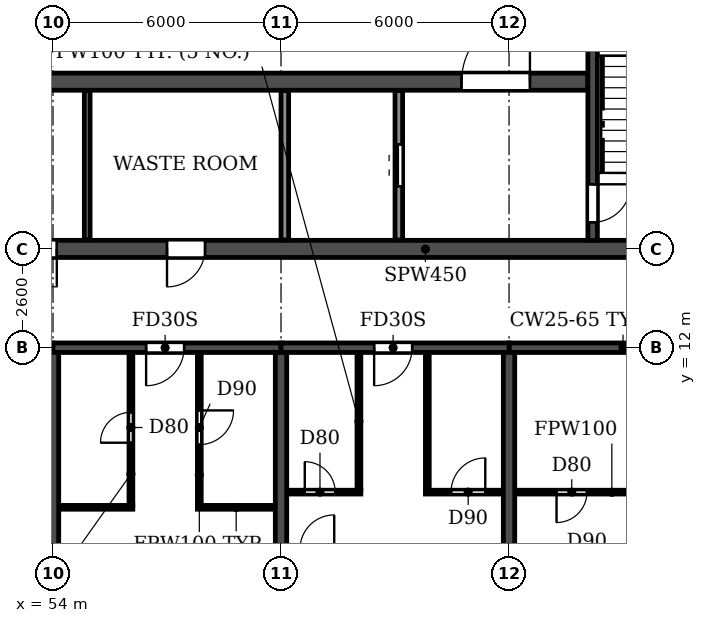
"""IFC4 building model, lengths in metres.
Left out: names, types, materials, properties, quantities, classifications, styles, units other than length and angle.
Written with IfcOpenShell. Run it as: python <this file> out.ifc"""

import sys

from ifc_helpers import new_model, si_unit, direction, frame, frame_2d, origin, place, context, subcontext, project, spatial, rectangle, extrude, element, fill, save


model = new_model("IFC4")
c1 = context("Model", 3, precision=1e-05, world=origin(), true_north=direction((0.0, 1.0)))
c2 = subcontext(c1, "Body", "Model", "MODEL_VIEW")
j1 = project(units=[si_unit("LENGTHUNIT", "METRE"), si_unit("PLANEANGLEUNIT", "RADIAN")], contexts=[c1])
p1 = place(None, origin())
s1 = spatial("IfcSite", under=j1, at=p1, CompositionType="ELEMENT")
p2 = place(p1, origin())
s2 = spatial("IfcBuilding", under=s1, at=p2, CompositionType="ELEMENT")
p3 = place(p2, frame((0.0, 0.0, 122.4)))
s3 = spatial("IfcBuildingStorey", under=s2, at=p3, CompositionType="ELEMENT", Elevation=122.4)
for number, where, z_axis, x_axis in (
    (1, (54.0, 0.2, 0.0), (0.0, 0.0, 1.0), (0.0, 1.0, 0.0)),
    (2, (60.0, 0.2, 0.0), (0.0, 0.0, 1.0), (0.0, 1.0, 0.0)),
    (3, (66.0, 0.2, 0.0), (0.0, 0.0, 1.0), (0.0, 1.0, 0.0)),
):
    element("IfcWall", number, at=place(p3, frame(where, z_axis=z_axis, x_axis=x_axis)), inside=s3, PredefinedType="SHEAR", context=c2, shape_type="SweptSolid", body=[
        extrude(rectangle(XDim=11.675, YDim=0.3, at=frame_2d((5.837, 0.0))), origin(), (0.0, 0.0, 1.0), 3.07),
    ])
p4 = place(p3, frame((48.0, 12.0, 0.0), z_axis=(0.0, 0.0, 1.0), x_axis=(1.0, 0.0, 0.0)))
e4 = element("IfcWall", 4, at=p4, inside=s3, PredefinedType="SHEAR", context=c2, shape_type="SweptSolid", body=[
    extrude(rectangle(XDim=6.0, YDim=0.25, at=frame_2d((3.0, 0.0))), origin(), (0.0, 0.0, 1.0), 2.47),
])
p5 = place(p4, frame((2.55, 0.0, 0.0)))
e5 = element("IfcOpeningElement", 5, at=p5, cuts=e4, PredefinedType="OPENING", context=c2, shape_type="SweptSolid", body=[
    extrude(rectangle(XDim=1.0, YDim=2.1, at=frame_2d((0.5, 1.05))), frame((0.0, 0.135, 0.0), z_axis=(0.0, -1.0, 0.0), x_axis=(1.0, 0.0, 0.0)), (0.0, 0.0, 1.0), 0.27),
])
p6 = place(p3, frame((54.0, 12.0, 0.0), z_axis=(0.0, 0.0, 1.0), x_axis=(1.0, 0.0, 0.0)))
e6 = element("IfcWall", 6, at=p6, inside=s3, PredefinedType="SHEAR", context=c2, shape_type="SweptSolid", body=[
    extrude(rectangle(XDim=6.0, YDim=0.25, at=frame_2d((3.0, 0.0))), origin(), (0.0, 0.0, 1.0), 2.47),
])
p7 = place(p6, frame((2.45, 0.0, 0.0)))
e7 = element("IfcOpeningElement", 7, at=p7, cuts=e6, PredefinedType="OPENING", context=c2, shape_type="SweptSolid", body=[
    extrude(rectangle(XDim=1.0, YDim=2.1, at=frame_2d((0.5, 1.05))), frame((0.0, 0.135, 0.0), z_axis=(0.0, -1.0, 0.0), x_axis=(1.0, 0.0, 0.0)), (0.0, 0.0, 1.0), 0.27),
])
p8 = place(p3, frame((60.0, 12.0, 0.0), z_axis=(0.0, 0.0, 1.0), x_axis=(1.0, 0.0, 0.0)))
e8 = element("IfcWall", 8, at=p8, inside=s3, PredefinedType="SHEAR", context=c2, shape_type="SweptSolid", body=[
    extrude(rectangle(XDim=6.0, YDim=0.25, at=frame_2d((3.0, 0.0))), origin(), (0.0, 0.0, 1.0), 2.47),
])
p9 = place(p8, frame((2.45, 0.0, 0.0)))
e9 = element("IfcOpeningElement", 9, at=p9, cuts=e8, PredefinedType="OPENING", context=c2, shape_type="SweptSolid", body=[
    extrude(rectangle(XDim=1.0, YDim=2.1, at=frame_2d((0.5, 1.05))), frame((0.0, 0.135, 0.0), z_axis=(0.0, -1.0, 0.0), x_axis=(1.0, 0.0, 0.0)), (0.0, 0.0, 1.0), 0.27),
])
p10 = place(p3, frame((66.0, 12.0, 0.0), z_axis=(0.0, 0.0, 1.0), x_axis=(1.0, 0.0, 0.0)))
e10 = element("IfcWall", 10, at=p10, inside=s3, PredefinedType="SHEAR", context=c2, shape_type="SweptSolid", body=[
    extrude(rectangle(XDim=6.0, YDim=0.25, at=frame_2d((3.0, 0.0))), origin(), (0.0, 0.0, 1.0), 2.47),
])
p11 = place(p3, frame((12.2, 14.6, 0.0), z_axis=(0.0, 0.0, 1.0), x_axis=(1.0, 0.0, 0.0)))
e11 = element("IfcWall", 11, at=p11, inside=s3, PredefinedType="SOLIDWALL", context=c2, shape_type="SweptSolid", body=[
    extrude(rectangle(XDim=77.6, YDim=0.45, at=frame_2d((38.8, 0.0))), origin(), (0.0, 0.0, 1.0), 3.07),
])
p12 = place(p11, frame((0.8, 0.0, 0.0)))
e12 = element("IfcOpeningElement", 12, at=p12, cuts=e11, PredefinedType="OPENING", context=c2, shape_type="SweptSolid", body=[
    extrude(rectangle(XDim=1.0, YDim=2.1, at=frame_2d((0.5, 1.05))), frame((0.0, 0.235, 0.0), z_axis=(0.0, -1.0, 0.0), x_axis=(1.0, 0.0, 0.0)), (0.0, 0.0, 1.0), 0.47),
])
p13 = place(p11, frame((3.8, 0.0, 0.0)))
e13 = element("IfcOpeningElement", 13, at=p13, cuts=e11, PredefinedType="OPENING", context=c2, shape_type="SweptSolid", body=[
    extrude(rectangle(XDim=1.0, YDim=2.1, at=frame_2d((0.5, 1.05))), frame((0.0, 0.235, 0.0), z_axis=(0.0, -1.0, 0.0), x_axis=(1.0, 0.0, 0.0)), (0.0, 0.0, 1.0), 0.47),
])
p14 = place(p11, frame((6.7, 0.0, 0.0)))
e14 = element("IfcOpeningElement", 14, at=p14, cuts=e11, PredefinedType="OPENING", context=c2, shape_type="SweptSolid", body=[
    extrude(rectangle(XDim=1.0, YDim=2.1, at=frame_2d((0.5, 1.05))), frame((0.0, 0.235, 0.0), z_axis=(0.0, -1.0, 0.0), x_axis=(1.0, 0.0, 0.0)), (0.0, 0.0, 1.0), 0.47),
])
p15 = place(p11, frame((14.6, 0.0, 0.0)))
e15 = element("IfcOpeningElement", 15, at=p15, cuts=e11, PredefinedType="OPENING", context=c2, shape_type="SweptSolid", body=[
    extrude(rectangle(XDim=1.0, YDim=2.1, at=frame_2d((0.5, 1.05))), frame((0.0, 0.235, 0.0), z_axis=(0.0, -1.0, 0.0), x_axis=(1.0, 0.0, 0.0)), (0.0, 0.0, 1.0), 0.47),
])
p16 = place(p11, frame((19.2, 0.0, 0.0)))
e16 = element("IfcOpeningElement", 16, at=p16, cuts=e11, PredefinedType="OPENING", context=c2, shape_type="SweptSolid", body=[
    extrude(rectangle(XDim=1.0, YDim=2.1, at=frame_2d((0.5, 1.05))), frame((0.0, 0.235, 0.0), z_axis=(0.0, -1.0, 0.0), x_axis=(1.0, 0.0, 0.0)), (0.0, 0.0, 1.0), 0.47),
])
p17 = place(p11, frame((30.5, 0.0, 0.0)))
e17 = element("IfcOpeningElement", 17, at=p17, cuts=e11, PredefinedType="OPENING", context=c2, shape_type="SweptSolid", body=[
    extrude(rectangle(XDim=1.0, YDim=2.1, at=frame_2d((0.5, 1.05))), frame((0.0, 0.235, 0.0), z_axis=(0.0, -1.0, 0.0), x_axis=(1.0, 0.0, 0.0)), (0.0, 0.0, 1.0), 0.47),
])
p18 = place(p11, frame((34.4, 0.0, 0.0)))
e18 = element("IfcOpeningElement", 18, at=p18, cuts=e11, PredefinedType="OPENING", context=c2, shape_type="SweptSolid", body=[
    extrude(rectangle(XDim=1.0, YDim=2.1, at=frame_2d((0.5, 1.05))), frame((0.0, 0.235, 0.0), z_axis=(0.0, -1.0, 0.0), x_axis=(1.0, 0.0, 0.0)), (0.0, 0.0, 1.0), 0.47),
])
p19 = place(p11, frame((38.3, 0.0, 0.0)))
e19 = element("IfcOpeningElement", 19, at=p19, cuts=e11, PredefinedType="OPENING", context=c2, shape_type="SweptSolid", body=[
    extrude(rectangle(XDim=1.0, YDim=2.1, at=frame_2d((0.5, 1.05))), frame((0.0, 0.235, 0.0), z_axis=(0.0, -1.0, 0.0), x_axis=(1.0, 0.0, 0.0)), (0.0, 0.0, 1.0), 0.47),
])
p20 = place(p11, frame((40.9, 0.0, 0.0)))
e20 = element("IfcOpeningElement", 20, at=p20, cuts=e11, PredefinedType="OPENING", context=c2, shape_type="SweptSolid", body=[
    extrude(rectangle(XDim=1.0, YDim=2.1, at=frame_2d((0.5, 1.05))), frame((0.0, 0.235, 0.0), z_axis=(0.0, -1.0, 0.0), x_axis=(1.0, 0.0, 0.0)), (0.0, 0.0, 1.0), 0.47),
])
p21 = place(p11, frame((44.8, 0.0, 0.0)))
e21 = element("IfcOpeningElement", 21, at=p21, cuts=e11, PredefinedType="OPENING", context=c2, shape_type="SweptSolid", body=[
    extrude(rectangle(XDim=1.0, YDim=2.1, at=frame_2d((0.5, 1.05))), frame((0.0, 0.235, 0.0), z_axis=(0.0, -1.0, 0.0), x_axis=(1.0, 0.0, 0.0)), (0.0, 0.0, 1.0), 0.47),
])
p22 = place(p11, frame((57.4, 0.0, 0.0)))
e22 = element("IfcOpeningElement", 22, at=p22, cuts=e11, PredefinedType="OPENING", context=c2, shape_type="SweptSolid", body=[
    extrude(rectangle(XDim=1.0, YDim=2.1, at=frame_2d((0.5, 1.05))), frame((0.0, 0.235, 0.0), z_axis=(0.0, -1.0, 0.0), x_axis=(1.0, 0.0, 0.0)), (0.0, 0.0, 1.0), 0.47),
])
p23 = place(p11, frame((62.0, 0.0, 0.0)))
e23 = element("IfcOpeningElement", 23, at=p23, cuts=e11, PredefinedType="OPENING", context=c2, shape_type="SweptSolid", body=[
    extrude(rectangle(XDim=1.0, YDim=2.1, at=frame_2d((0.5, 1.05))), frame((0.0, 0.235, 0.0), z_axis=(0.0, -1.0, 0.0), x_axis=(1.0, 0.0, 0.0)), (0.0, 0.0, 1.0), 0.47),
])
p24 = place(p11, frame((69.9, 0.0, 0.0)))
e24 = element("IfcOpeningElement", 24, at=p24, cuts=e11, PredefinedType="OPENING", context=c2, shape_type="SweptSolid", body=[
    extrude(rectangle(XDim=1.0, YDim=2.1, at=frame_2d((0.5, 1.05))), frame((0.0, 0.235, 0.0), z_axis=(0.0, -1.0, 0.0), x_axis=(1.0, 0.0, 0.0)), (0.0, 0.0, 1.0), 0.47),
])
p25 = place(p11, frame((72.8, 0.0, 0.0)))
e25 = element("IfcOpeningElement", 25, at=p25, cuts=e11, PredefinedType="OPENING", context=c2, shape_type="SweptSolid", body=[
    extrude(rectangle(XDim=1.0, YDim=2.1, at=frame_2d((0.5, 1.05))), frame((0.0, 0.235, 0.0), z_axis=(0.0, -1.0, 0.0), x_axis=(1.0, 0.0, 0.0)), (0.0, 0.0, 1.0), 0.47),
])
p26 = place(p11, frame((75.8, 0.0, 0.0)))
e26 = element("IfcOpeningElement", 26, at=p26, cuts=e11, PredefinedType="OPENING", context=c2, shape_type="SweptSolid", body=[
    extrude(rectangle(XDim=1.0, YDim=2.1, at=frame_2d((0.5, 1.05))), frame((0.0, 0.235, 0.0), z_axis=(0.0, -1.0, 0.0), x_axis=(1.0, 0.0, 0.0)), (0.0, 0.0, 1.0), 0.47),
])
p27 = place(p3, frame((33.925, 19.0, 0.0), z_axis=(0.0, 0.0, 1.0), x_axis=(1.0, 0.0, 0.0)))
e27 = element("IfcWall", 27, at=p27, inside=s3, PredefinedType="SOLIDWALL", context=c2, shape_type="SweptSolid", body=[
    extrude(rectangle(XDim=34.15, YDim=0.45, at=frame_2d((17.075, 0.0))), origin(), (0.0, 0.0, 1.0), 3.07),
])
p28 = place(p27, frame((16.175, 0.0, 0.0)))
e28 = element("IfcOpeningElement", 28, at=p28, cuts=e27, PredefinedType="OPENING", context=c2, shape_type="SweptSolid", body=[
    extrude(rectangle(XDim=1.8, YDim=2.1, at=frame_2d((0.9, 1.05))), frame((0.0, 0.235, 0.0), z_axis=(0.0, -1.0, 0.0), x_axis=(1.0, 0.0, 0.0)), (0.0, 0.0, 1.0), 0.47),
])
p29 = place(p27, frame((1.525, 0.0, 0.0)))
e29 = element("IfcOpeningElement", 29, at=p29, cuts=e27, PredefinedType="OPENING", context=c2, shape_type="SweptSolid", body=[
    extrude(rectangle(XDim=1.8, YDim=2.1, at=frame_2d((0.9, 1.05))), frame((0.0, 0.235, 0.0), z_axis=(0.0, -1.0, 0.0), x_axis=(1.0, 0.0, 0.0)), (0.0, 0.0, 1.0), 0.47),
])
p30 = place(p27, frame((30.825, 0.0, 0.0)))
e30 = element("IfcOpeningElement", 30, at=p30, cuts=e27, PredefinedType="OPENING", context=c2, shape_type="SweptSolid", body=[
    extrude(rectangle(XDim=1.8, YDim=2.1, at=frame_2d((0.9, 1.05))), frame((0.0, 0.235, 0.0), z_axis=(0.0, -1.0, 0.0), x_axis=(1.0, 0.0, 0.0)), (0.0, 0.0, 1.0), 0.47),
])
p31 = place(p3, frame((68.2, 14.825, 0.0), z_axis=(0.0, 0.0, 1.0), x_axis=(0.0, 1.0, 0.0)))
e31 = element("IfcWall", 31, at=p31, inside=s3, PredefinedType="SOLIDWALL", context=c2, shape_type="SweptSolid", body=[
    extrude(rectangle(XDim=7.65, YDim=0.25, at=frame_2d((3.825, 0.0))), origin(), (0.0, 0.0, 1.0), 3.07),
])
p32 = place(p31, frame((0.475, 0.0, 0.0)))
e32 = element("IfcOpeningElement", 32, at=p32, cuts=e31, PredefinedType="OPENING", context=c2, shape_type="SweptSolid", body=[
    extrude(rectangle(XDim=1.0, YDim=2.1, at=frame_2d((0.5, 1.05))), frame((0.0, 0.135, 0.0), z_axis=(0.0, -1.0, 0.0), x_axis=(1.0, 0.0, 0.0)), (0.0, 0.0, 1.0), 0.27),
])
p33 = place(p3, frame((54.16, 7.8, 0.0), z_axis=(0.0, 0.0, 1.0), x_axis=(1.0, 0.0, 0.0)))
e33 = element("IfcWall", 33, at=p33, inside=s3, PredefinedType="PARTITIONING", context=c2, shape_type="SweptSolid", body=[
    extrude(rectangle(XDim=1.94, YDim=0.1, at=frame_2d((0.97, 0.0))), origin(), (0.0, 0.0, 1.0), 3.07),
])
p34 = place(p3, frame((57.8, 7.8, 0.0), z_axis=(0.0, 0.0, 1.0), x_axis=(1.0, 0.0, 0.0)))
e34 = element("IfcWall", 34, at=p34, inside=s3, PredefinedType="PARTITIONING", context=c2, shape_type="SweptSolid", body=[
    extrude(rectangle(XDim=2.04, YDim=0.1, at=frame_2d((1.02, 0.0))), origin(), (0.0, 0.0, 1.0), 3.07),
])
p35 = place(p3, frame((60.16, 8.2, 0.0), z_axis=(0.0, 0.0, 1.0), x_axis=(1.0, 0.0, 0.0)))
e35 = element("IfcWall", 35, at=p35, inside=s3, PredefinedType="PARTITIONING", context=c2, shape_type="SweptSolid", body=[
    extrude(rectangle(XDim=1.94, YDim=0.1, at=frame_2d((0.97, 0.0))), origin(), (0.0, 0.0, 1.0), 3.07),
])
p36 = place(p35, frame((0.465, 0.0, 0.0)))
e36 = element("IfcOpeningElement", 36, at=p36, cuts=e35, PredefinedType="OPENING", context=c2, shape_type="SweptSolid", body=[
    extrude(rectangle(XDim=0.8, YDim=2.1, at=frame_2d((0.4, 1.05))), frame((0.0, 0.06, 0.0), z_axis=(0.0, -1.0, 0.0), x_axis=(1.0, 0.0, 0.0)), (0.0, 0.0, 1.0), 0.12),
])
p37 = place(p3, frame((63.8, 8.2, 0.0), z_axis=(0.0, 0.0, 1.0), x_axis=(1.0, 0.0, 0.0)))
e37 = element("IfcWall", 37, at=p37, inside=s3, PredefinedType="PARTITIONING", context=c2, shape_type="SweptSolid", body=[
    extrude(rectangle(XDim=2.04, YDim=0.1, at=frame_2d((1.02, 0.0))), origin(), (0.0, 0.0, 1.0), 3.07),
])
p38 = place(p37, frame((0.675, 0.0, 0.0)))
e38 = element("IfcOpeningElement", 38, at=p38, cuts=e37, PredefinedType="OPENING", context=c2, shape_type="SweptSolid", body=[
    extrude(rectangle(XDim=0.9, YDim=2.1, at=frame_2d((0.45, 1.05))), frame((0.0, 0.06, 0.0), z_axis=(0.0, -1.0, 0.0), x_axis=(1.0, 0.0, 0.0)), (0.0, 0.0, 1.0), 0.12),
])
p39 = place(p3, frame((66.16, 8.2, 0.0), z_axis=(0.0, 0.0, 1.0), x_axis=(1.0, 0.0, 0.0)))
e39 = element("IfcWall", 39, at=p39, inside=s3, PredefinedType="PARTITIONING", context=c2, shape_type="SweptSolid", body=[
    extrude(rectangle(XDim=3.19, YDim=0.1, at=frame_2d((1.595, 0.0))), origin(), (0.0, 0.0, 1.0), 3.07),
])
p40 = place(p39, frame((1.09, 0.0, 0.0)))
e40 = element("IfcOpeningElement", 40, at=p40, cuts=e39, PredefinedType="OPENING", context=c2, shape_type="SweptSolid", body=[
    extrude(rectangle(XDim=0.8, YDim=2.1, at=frame_2d((0.4, 1.05))), frame((0.0, 0.06, 0.0), z_axis=(0.0, -1.0, 0.0), x_axis=(1.0, 0.0, 0.0)), (0.0, 0.0, 1.0), 0.12),
])
p41 = place(p3, frame((56.05, 7.85, 0.0), z_axis=(0.0, 0.0, 1.0), x_axis=(0.0, 1.0, 0.0)))
e41 = element("IfcWall", 41, at=p41, inside=s3, PredefinedType="PARTITIONING", context=c2, shape_type="SweptSolid", body=[
    extrude(rectangle(XDim=4.015, YDim=0.1, at=frame_2d((2.007, 0.0))), origin(), (0.0, 0.0, 1.0), 3.07),
])
p42 = place(p41, frame((1.65, 0.0, 0.0)))
e42 = element("IfcOpeningElement", 42, at=p42, cuts=e41, PredefinedType="OPENING", context=c2, shape_type="SweptSolid", body=[
    extrude(rectangle(XDim=0.8, YDim=2.1, at=frame_2d((0.4, 1.05))), frame((0.0, 0.06, 0.0), z_axis=(0.0, -1.0, 0.0), x_axis=(1.0, 0.0, 0.0)), (0.0, 0.0, 1.0), 0.12),
])
p43 = place(p3, frame((57.85, 7.85, 0.0), z_axis=(0.0, 0.0, 1.0), x_axis=(0.0, 1.0, 0.0)))
e43 = element("IfcWall", 43, at=p43, inside=s3, PredefinedType="PARTITIONING", context=c2, shape_type="SweptSolid", body=[
    extrude(rectangle(XDim=4.015, YDim=0.1, at=frame_2d((2.007, 0.0))), origin(), (0.0, 0.0, 1.0), 3.07),
])
p44 = place(p43, frame((1.6, 0.0, 0.0)))
e44 = element("IfcOpeningElement", 44, at=p44, cuts=e43, PredefinedType="OPENING", context=c2, shape_type="SweptSolid", body=[
    extrude(rectangle(XDim=0.9, YDim=2.1, at=frame_2d((0.45, 1.05))), frame((0.0, 0.06, 0.0), z_axis=(0.0, -1.0, 0.0), x_axis=(1.0, 0.0, 0.0)), (0.0, 0.0, 1.0), 0.12),
])
for number, where, z_axis, x_axis in (
    (45, (62.05, 8.25, 0.0), (0.0, 0.0, 1.0), (0.0, 1.0, 0.0)),
    (46, (63.85, 8.25, 0.0), (0.0, 0.0, 1.0), (0.0, 1.0, 0.0)),
):
    element("IfcWall", number, at=place(p3, frame(where, z_axis=z_axis, x_axis=x_axis)), inside=s3, PredefinedType="PARTITIONING", context=c2, shape_type="SweptSolid", body=[
        extrude(rectangle(XDim=3.615, YDim=0.1, at=frame_2d((1.808, 0.0))), origin(), (0.0, 0.0, 1.0), 3.07),
    ])
p45 = place(p3, frame((54.9, 14.835, 0.0), z_axis=(0.0, 0.0, 1.0), x_axis=(0.0, 1.0, 0.0)))
e47 = element("IfcWall", 47, at=p45, inside=s3, PredefinedType="PARTITIONING", context=c2, shape_type="SweptSolid", body=[
    extrude(rectangle(XDim=3.93, YDim=0.15, at=frame_2d((1.965, 0.0))), origin(), (0.0, 0.0, 1.0), 3.07),
])
p46 = place(p3, frame((60.1, 14.835, 0.0), z_axis=(0.0, 0.0, 1.0), x_axis=(0.0, 1.0, 0.0)))
e48 = element("IfcWall", 48, at=p46, inside=s3, PredefinedType="PARTITIONING", context=c2, shape_type="SweptSolid", body=[
    extrude(rectangle(XDim=3.93, YDim=0.2, at=frame_2d((1.965, 0.0))), origin(), (0.0, 0.0, 1.0), 3.07),
])
p47 = place(p3, frame((63.1, 14.835, 0.0), z_axis=(0.0, 0.0, 1.0), x_axis=(0.0, 1.0, 0.0)))
e49 = element("IfcWall", 49, at=p47, inside=s3, PredefinedType="PARTITIONING", context=c2, shape_type="SweptSolid", body=[
    extrude(rectangle(XDim=3.93, YDim=0.2, at=frame_2d((1.965, 0.0))), origin(), (0.0, 0.0, 1.0), 3.07),
])
p48 = place(p47, frame((1.415, 0.0, 0.0)))
e50 = element("IfcOpeningElement", 50, at=p48, cuts=e49, PredefinedType="OPENING", context=c2, shape_type="SweptSolid", body=[
    extrude(rectangle(XDim=1.1, YDim=2.1, at=frame_2d((0.55, 1.05))), frame((0.0, 0.11, 0.0), z_axis=(0.0, -1.0, 0.0), x_axis=(1.0, 0.0, 0.0)), (0.0, 0.0, 1.0), 0.22),
])
p49 = place(p20, frame((1.0, 0.0, 0.0), z_axis=(0.0, 0.0, 1.0), x_axis=(-1.0, 0.0, 0.0)))
e51 = element("IfcDoor", 51, at=p49, inside=s3, OperationType="SINGLE_SWING_LEFT", PredefinedType="DOOR", context=c2, shape_type="SweptSolid", body=[
    extrude(rectangle(XDim=1.0, YDim=2.1, at=frame_2d((0.5, 1.05))), frame((0.0, 0.025, 0.0), z_axis=(0.0, -1.0, 0.0), x_axis=(1.0, 0.0, 0.0)), (0.0, 0.0, 1.0), 0.05),
])
fill(e20, e51)
p50 = place(p21, frame((1.0, 0.0, 0.0), z_axis=(0.0, 0.0, 1.0), x_axis=(-1.0, 0.0, 0.0)))
e52 = element("IfcDoor", 52, at=p50, inside=s3, OperationType="SINGLE_SWING_RIGHT", PredefinedType="DOOR", context=c2, shape_type="SweptSolid", body=[
    extrude(rectangle(XDim=1.0, YDim=2.1, at=frame_2d((0.5, 1.05))), frame((0.0, 0.025, 0.0), z_axis=(0.0, -1.0, 0.0), x_axis=(1.0, 0.0, 0.0)), (0.0, 0.0, 1.0), 0.05),
])
fill(e21, e52)
p51 = place(p42, origin())
e53 = element("IfcDoor", 53, at=p51, inside=s3, OperationType="SINGLE_SWING_LEFT", PredefinedType="DOOR", context=c2, shape_type="SweptSolid", body=[
    extrude(rectangle(XDim=0.8, YDim=2.1, at=frame_2d((0.4, 1.05))), frame((0.0, 0.025, 0.0), z_axis=(0.0, -1.0, 0.0), x_axis=(1.0, 0.0, 0.0)), (0.0, 0.0, 1.0), 0.05),
])
fill(e42, e53)
p52 = place(p7, frame((1.0, 0.0, 0.0), z_axis=(0.0, 0.0, 1.0), x_axis=(-1.0, 0.0, 0.0)))
e54 = element("IfcDoor", 54, at=p52, inside=s3, OperationType="SINGLE_SWING_RIGHT", PredefinedType="DOOR", context=c2, shape_type="SweptSolid", body=[
    extrude(rectangle(XDim=1.0, YDim=2.1, at=frame_2d((0.5, 1.05))), frame((0.0, 0.025, 0.0), z_axis=(0.0, -1.0, 0.0), x_axis=(1.0, 0.0, 0.0)), (0.0, 0.0, 1.0), 0.05),
])
fill(e7, e54)
p53 = place(p44, frame((0.9, 0.0, 0.0), z_axis=(0.0, 0.0, 1.0), x_axis=(-1.0, 0.0, 0.0)))
e55 = element("IfcDoor", 55, at=p53, inside=s3, OperationType="SINGLE_SWING_LEFT", PredefinedType="DOOR", context=c2, shape_type="SweptSolid", body=[
    extrude(rectangle(XDim=0.9, YDim=2.1, at=frame_2d((0.45, 1.05))), frame((0.0, 0.025, 0.0), z_axis=(0.0, -1.0, 0.0), x_axis=(1.0, 0.0, 0.0)), (0.0, 0.0, 1.0), 0.05),
])
fill(e44, e55)
p54 = place(p36, origin())
e56 = element("IfcDoor", 56, at=p54, inside=s3, OperationType="SINGLE_SWING_LEFT", PredefinedType="DOOR", context=c2, shape_type="SweptSolid", body=[
    extrude(rectangle(XDim=0.8, YDim=2.1, at=frame_2d((0.4, 1.05))), frame((0.0, 0.025, 0.0), z_axis=(0.0, -1.0, 0.0), x_axis=(1.0, 0.0, 0.0)), (0.0, 0.0, 1.0), 0.05),
])
fill(e36, e56)
p55 = place(p9, frame((1.0, 0.0, 0.0), z_axis=(0.0, 0.0, 1.0), x_axis=(-1.0, 0.0, 0.0)))
e57 = element("IfcDoor", 57, at=p55, inside=s3, OperationType="SINGLE_SWING_RIGHT", PredefinedType="DOOR", context=c2, shape_type="SweptSolid", body=[
    extrude(rectangle(XDim=1.0, YDim=2.1, at=frame_2d((0.5, 1.05))), frame((0.0, 0.025, 0.0), z_axis=(0.0, -1.0, 0.0), x_axis=(1.0, 0.0, 0.0)), (0.0, 0.0, 1.0), 0.05),
])
fill(e9, e57)
p56 = place(p38, origin())
e58 = element("IfcDoor", 58, at=p56, inside=s3, OperationType="SINGLE_SWING_RIGHT", PredefinedType="DOOR", context=c2, shape_type="SweptSolid", body=[
    extrude(rectangle(XDim=0.9, YDim=2.1, at=frame_2d((0.45, 1.05))), frame((0.0, 0.025, 0.0), z_axis=(0.0, -1.0, 0.0), x_axis=(1.0, 0.0, 0.0)), (0.0, 0.0, 1.0), 0.05),
])
fill(e38, e58)
p57 = place(p40, frame((0.8, 0.0, 0.0), z_axis=(0.0, 0.0, 1.0), x_axis=(-1.0, 0.0, 0.0)))
e59 = element("IfcDoor", 59, at=p57, inside=s3, OperationType="SINGLE_SWING_RIGHT", PredefinedType="DOOR", context=c2, shape_type="SweptSolid", body=[
    extrude(rectangle(XDim=0.8, YDim=2.1, at=frame_2d((0.4, 1.05))), frame((0.0, 0.025, 0.0), z_axis=(0.0, -1.0, 0.0), x_axis=(1.0, 0.0, 0.0)), (0.0, 0.0, 1.0), 0.05),
])
fill(e40, e59)
p58 = place(p48, origin())
e60 = element("IfcDoor", 60, at=p58, inside=s3, OperationType="DOUBLE_DOOR_SLIDING", PredefinedType="DOOR", context=c2, shape_type="SweptSolid", body=[
    extrude(rectangle(XDim=1.1, YDim=2.1, at=frame_2d((0.55, 1.05))), frame((0.0, 0.025, 0.0), z_axis=(0.0, -1.0, 0.0), x_axis=(1.0, 0.0, 0.0)), (0.0, 0.0, 1.0), 0.05),
])
fill(e50, e60)
p59 = place(p32, frame((1.0, 0.0, 0.0), z_axis=(0.0, 0.0, 1.0), x_axis=(-1.0, 0.0, 0.0)))
e61 = element("IfcDoor", 61, at=p59, inside=s3, OperationType="SINGLE_SWING_LEFT", PredefinedType="DOOR", context=c2, shape_type="SweptSolid", body=[
    extrude(rectangle(XDim=1.0, YDim=2.1, at=frame_2d((0.5, 1.05))), frame((0.0, 0.025, 0.0), z_axis=(0.0, -1.0, 0.0), x_axis=(1.0, 0.0, 0.0)), (0.0, 0.0, 1.0), 0.05),
])
fill(e32, e61)
p60 = place(p30, origin())
e62 = element("IfcDoor", 62, at=p60, inside=s3, OperationType="DOUBLE_DOOR_SINGLE_SWING", PredefinedType="DOOR", context=c2, shape_type="SweptSolid", body=[
    extrude(rectangle(XDim=1.8, YDim=2.1, at=frame_2d((0.9, 1.05))), frame((0.0, 0.025, 0.0), z_axis=(0.0, -1.0, 0.0), x_axis=(1.0, 0.0, 0.0)), (0.0, 0.0, 1.0), 0.05),
])
fill(e30, e62)
save(model, sys.argv[1])
